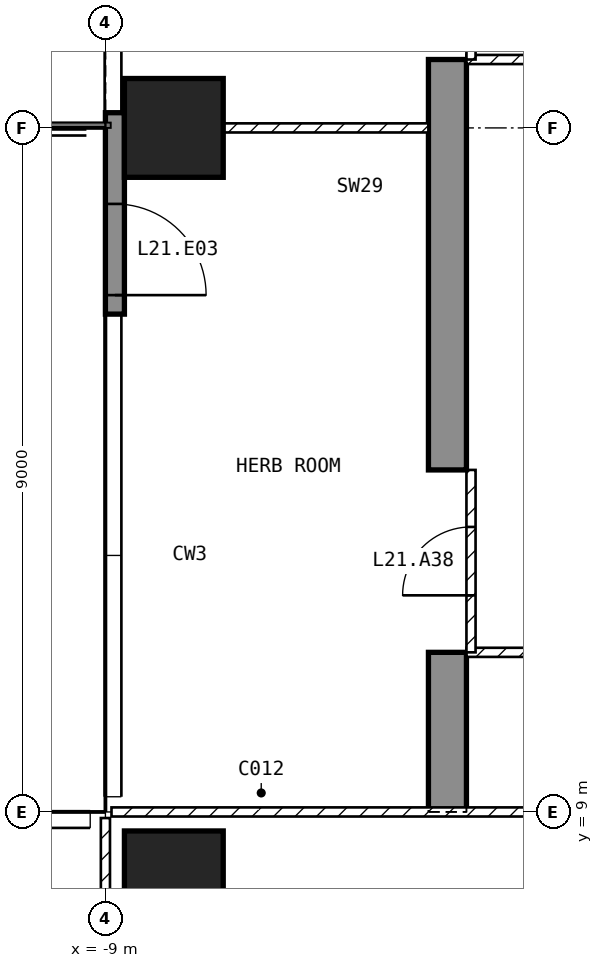
"""IFC4 building model, lengths in metres.
Left out: names, types, materials, properties, quantities, classifications, styles, units other than length and angle.
Written with IfcOpenShell. Run it as: python <this file> out.ifc"""

import sys

from ifc_helpers import new_model, si_unit, direction, frame, frame_2d, origin, origin_2d, place, context, subcontext, project, spatial, polyline, rectangle, outline, extrude, element, fill, save


model = new_model("IFC4")
c1 = context("Model", 3, precision=1e-05, world=origin(), true_north=direction((0.0, 1.0)))
c2 = subcontext(c1, "Body", "Model", "MODEL_VIEW")
j1 = project(units=[si_unit("LENGTHUNIT", "METRE"), si_unit("PLANEANGLEUNIT", "RADIAN")], contexts=[c1])
p1 = place(None, origin())
s1 = spatial("IfcSite", under=j1, at=p1, CompositionType="ELEMENT")
p2 = place(p1, origin())
s2 = spatial("IfcBuilding", under=s1, at=p2, CompositionType="ELEMENT")
p3 = place(p2, frame((0.0, 0.0, 92.5)))
s3 = spatial("IfcBuildingStorey", under=s2, at=p3, CompositionType="ELEMENT", Elevation=92.5)
for number, where, z_axis, x_axis in (
    (1, (-8.1, 8.1, -0.3), (0.0, 0.0, 1.0), (1.0, 0.0, 0.0)),
    (2, (-8.1, 18.0, -0.3), (0.0, 0.0, 1.0), (1.0, 0.0, 0.0)),
):
    element("IfcColumn", number, at=place(p3, frame(where, z_axis=z_axis, x_axis=x_axis)), inside=s3, PredefinedType="COLUMN", context=c2, shape_type="SweptSolid", body=[
        extrude(rectangle(XDim=1.3, YDim=1.3, at=origin_2d()), origin(), (0.0, 0.0, 1.0), 5.25),
    ])
p4 = place(p3, frame((-4.75, 9.0, -0.3), z_axis=(1.0, 0.0, 0.0), x_axis=(0.0, 1.0, 0.0)))
e3 = element("IfcWall", 3, at=p4, inside=s3, PredefinedType="SHEAR", context=c2, shape_type="SweptSolid", body=[
    extrude(outline(polyline([(0.0, 0.0), (2.1, 0.0), (2.1, 2.7), (4.5, 2.7), (4.5, 0.0), (9.9, 0.0), (9.9, 2.7), (12.3, 2.7), (12.3, 0.0), (16.45, 0.0), (16.45, 5.25), (0.0, 5.25), (0.0, 0.0)])), origin(), (0.0, 0.0, 1.0), 0.5),
])
p5 = place(p3, frame((-8.875, 18.2, 0.0), z_axis=(0.0, 0.0, 1.0), x_axis=(0.0, -1.0, 0.0)))
e4 = element("IfcWall", 4, at=p5, inside=s3, PredefinedType="SOLIDWALL", context=c2, shape_type="SweptSolid", body=[
    extrude(rectangle(XDim=2.65, YDim=0.25, at=frame_2d((1.325, 0.0))), origin(), (0.0, 0.0, 1.0), 4.95),
])
p6 = place(p5, frame((1.2, 0.0, 0.0)))
e5 = element("IfcOpeningElement", 5, at=p6, cuts=e4, PredefinedType="OPENING", context=c2, shape_type="SweptSolid", body=[
    extrude(rectangle(XDim=1.2, YDim=2.4, at=frame_2d((0.6, 1.2))), frame((0.0, 0.135, 0.0), z_axis=(0.0, -1.0, 0.0), x_axis=(1.0, 0.0, 0.0)), (0.0, 0.0, 1.0), 0.27),
])
p7 = place(p3, frame((-9.0, 1.26, 0.0), z_axis=(0.0, 0.0, 1.0), x_axis=(0.0, 1.0, 0.0)))
e6 = element("IfcWall", 6, at=p7, inside=s3, PredefinedType="PARTITIONING", context=c2, shape_type="SweptSolid", body=[
    extrude(rectangle(XDim=7.66, YDim=0.12, at=frame_2d((3.83, 0.0))), origin(), (0.0, 0.0, 1.0), 4.95),
])
p8 = place(p7, frame((4.09, 0.0, 0.0)))
e7 = element("IfcOpeningElement", 7, at=p8, cuts=e6, PredefinedType="OPENING", context=c2, shape_type="SweptSolid", body=[
    extrude(rectangle(XDim=0.9, YDim=2.1, at=frame_2d((0.45, 1.05))), frame((0.0, 0.07, 0.0), z_axis=(0.0, -1.0, 0.0), x_axis=(1.0, 0.0, 0.0)), (0.0, 0.0, 1.0), 0.14),
])
p9 = place(p3, frame((-8.92, 9.0, 0.0), z_axis=(0.0, 0.0, 1.0), x_axis=(1.0, 0.0, 0.0)))
e8 = element("IfcWall", 8, at=p9, inside=s3, PredefinedType="PARTITIONING", context=c2, shape_type="SweptSolid", body=[
    extrude(rectangle(XDim=11.02, YDim=0.12, at=frame_2d((5.51, 0.0))), origin(), (0.0, 0.0, 1.0), 4.95),
])
p10 = place(p9, frame((8.02, 0.0, 0.0)))
e9 = element("IfcOpeningElement", 9, at=p10, cuts=e8, PredefinedType="OPENING", context=c2, shape_type="SweptSolid", body=[
    extrude(rectangle(XDim=1.8, YDim=2.1, at=frame_2d((0.9, 1.05))), frame((0.0, 0.07, 0.0), z_axis=(0.0, -1.0, 0.0), x_axis=(1.0, 0.0, 0.0)), (0.0, 0.0, 1.0), 0.14),
])
p11 = place(p3, frame((-4.25, 11.1, 0.0), z_axis=(0.0, 0.0, 1.0), x_axis=(1.0, 0.0, 0.0)))
e10 = element("IfcWall", 10, at=p11, inside=s3, PredefinedType="PARTITIONING", context=c2, shape_type="SweptSolid", body=[
    extrude(rectangle(XDim=6.35, YDim=0.12, at=frame_2d((3.175, 0.0))), origin(), (0.0, 0.0, 1.0), 4.95),
])
p12 = place(p11, frame((2.275, 0.0, 0.0)))
e11 = element("IfcOpeningElement", 11, at=p12, cuts=e10, PredefinedType="OPENING", context=c2, shape_type="SweptSolid", body=[
    extrude(rectangle(XDim=1.8, YDim=2.1, at=frame_2d((0.9, 1.05))), frame((0.0, 0.07, 0.0), z_axis=(0.0, -1.0, 0.0), x_axis=(1.0, 0.0, 0.0)), (0.0, 0.0, 1.0), 0.14),
])
p13 = place(p3, frame((-4.25, 18.9, 0.0), z_axis=(0.0, 0.0, 1.0), x_axis=(1.0, 0.0, 0.0)))
e12 = element("IfcWall", 12, at=p13, inside=s3, PredefinedType="PARTITIONING", context=c2, shape_type="SweptSolid", body=[
    extrude(rectangle(XDim=8.5, YDim=0.12, at=frame_2d((4.25, 0.0))), origin(), (0.0, 0.0, 1.0), 4.95),
])
p14 = place(p13, frame((5.675, 0.0, 0.0)))
e13 = element("IfcOpeningElement", 13, at=p14, cuts=e12, PredefinedType="OPENING", context=c2, shape_type="SweptSolid", body=[
    extrude(rectangle(XDim=0.9, YDim=2.1, at=frame_2d((0.45, 1.05))), frame((0.0, 0.07, 0.0), z_axis=(0.0, -1.0, 0.0), x_axis=(1.0, 0.0, 0.0)), (0.0, 0.0, 1.0), 0.14),
])
p15 = place(p3, frame((-7.45, 18.0, 0.0), z_axis=(0.0, 0.0, 1.0), x_axis=(1.0, 0.0, 0.0)))
e14 = element("IfcWall", 14, at=p15, inside=s3, PredefinedType="PARTITIONING", context=c2, shape_type="SweptSolid", body=[
    extrude(rectangle(XDim=2.7, YDim=0.12, at=frame_2d((1.35, 0.0))), origin(), (0.0, 0.0, 1.0), 4.046),
])
p16 = place(p3, frame((-4.19, 11.1, 0.0), z_axis=(0.0, 0.0, 1.0), x_axis=(0.0, 1.0, 0.0)))
e15 = element("IfcWall", 15, at=p16, inside=s3, PredefinedType="PARTITIONING", context=c2, shape_type="SweptSolid", body=[
    extrude(rectangle(XDim=2.4, YDim=0.12, at=frame_2d((1.2, 0.0))), origin(), (0.0, 0.0, 1.0), 2.4),
])
p17 = place(p16, frame((0.75, 0.0, 0.0)))
e16 = element("IfcOpeningElement", 16, at=p17, cuts=e15, PredefinedType="OPENING", context=c2, shape_type="SweptSolid", body=[
    extrude(rectangle(XDim=0.9, YDim=2.1, at=frame_2d((0.45, 1.05))), frame((0.0, 0.07, 0.0), z_axis=(0.0, -1.0, 0.0), x_axis=(1.0, 0.0, 0.0)), (0.0, 0.0, 1.0), 0.14),
])
p18 = place(p3, frame((-4.19, 18.9, 0.0), z_axis=(0.0, 0.0, 1.0), x_axis=(0.0, 1.0, 0.0)))
e17 = element("IfcWall", 17, at=p18, inside=s3, PredefinedType="PARTITIONING", context=c2, shape_type="SweptSolid", body=[
    extrude(rectangle(XDim=2.4, YDim=0.12, at=frame_2d((1.2, 0.0))), origin(), (0.0, 0.0, 1.0), 2.4),
])
p19 = place(p18, frame((0.75, 0.0, 0.0)))
e18 = element("IfcOpeningElement", 18, at=p19, cuts=e17, PredefinedType="OPENING", context=c2, shape_type="SweptSolid", body=[
    extrude(rectangle(XDim=0.9, YDim=2.1, at=frame_2d((0.45, 1.05))), frame((0.0, 0.07, 0.0), z_axis=(0.0, -1.0, 0.0), x_axis=(1.0, 0.0, 0.0)), (0.0, 0.0, 1.0), 0.14),
])
p20 = place(p6, origin())
e19 = element("IfcDoor", 19, at=p20, inside=s3, OperationType="SINGLE_SWING_RIGHT", PredefinedType="DOOR", context=c2, shape_type="SweptSolid", body=[
    extrude(rectangle(XDim=1.2, YDim=2.4, at=frame_2d((0.6, 1.2))), frame((0.0, 0.025, 0.0), z_axis=(0.0, -1.0, 0.0), x_axis=(1.0, 0.0, 0.0)), (0.0, 0.0, 1.0), 0.05),
])
fill(e5, e19)
p21 = place(p17, origin())
e20 = element("IfcDoor", 20, at=p21, inside=s3, OperationType="SINGLE_SWING_LEFT", PredefinedType="DOOR", context=c2, shape_type="SweptSolid", body=[
    extrude(rectangle(XDim=0.9, YDim=2.1, at=frame_2d((0.45, 1.05))), frame((0.0, 0.025, 0.0), z_axis=(0.0, -1.0, 0.0), x_axis=(1.0, 0.0, 0.0)), (0.0, 0.0, 1.0), 0.05),
])
fill(e16, e20)
save(model, sys.argv[1])
